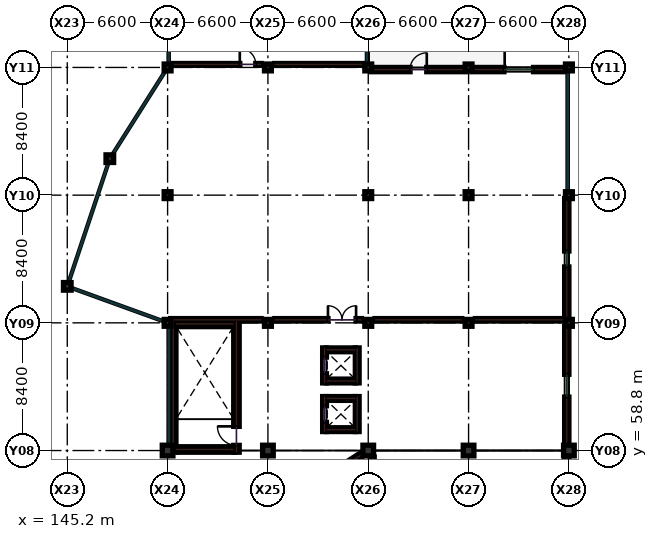
"""IFC4 building model, lengths in metres.
Left out: names, types, materials, properties, quantities, classifications, styles, units other than length and angle.
Written with IfcOpenShell. Run it as: python <this file> out.ifc"""

import sys

from ifc_helpers import new_model, si_unit, direction, frame, frame_2d, origin, origin_2d, place, context, subcontext, project, spatial, rectangle, extrude, element, fill, save


model = new_model("IFC4")
c1 = context("Model", 3, precision=1e-05, world=origin(), true_north=direction((0.0, 1.0)))
c2 = subcontext(c1, "Body", "Model", "MODEL_VIEW")
j1 = project(units=[si_unit("LENGTHUNIT", "METRE"), si_unit("PLANEANGLEUNIT", "RADIAN")], contexts=[c1])
p1 = place(None, origin())
s1 = spatial("IfcSite", under=j1, at=p1, CompositionType="ELEMENT")
p2 = place(p1, origin())
s2 = spatial("IfcBuilding", under=s1, at=p2, CompositionType="ELEMENT")
p3 = place(p2, frame((0.0, 0.0, 18.6)))
s3 = spatial("IfcBuildingStorey", under=s2, at=p3, CompositionType="ELEMENT", Elevation=18.6)
p4 = place(p3, frame((151.8, 58.8, 0.0), z_axis=(0.0, 0.0, 1.0), x_axis=(1.0, 0.0, 0.0)))
e1 = element("IfcColumn", 1, at=p4, inside=s3, PredefinedType="COLUMN", context=c2, shape_type="SweptSolid", body=[
    extrude(rectangle(XDim=0.7, YDim=0.7, at=origin_2d()), origin(), (0.0, 0.0, 1.0), 4.2),
])
for number, where, z_axis, x_axis in (
    (2, (151.8, 67.2, 0.0), (0.0, 0.0, 1.0), (1.0, 0.0, 0.0)),
    (3, (151.8, 75.6, 0.0), (0.0, 0.0, 1.0), (1.0, 0.0, 0.0)),
    (4, (151.8, 84.0, 0.0), (0.0, 0.0, 1.0), (1.0, 0.0, 0.0)),
):
    element("IfcColumn", number, at=place(p3, frame(where, z_axis=z_axis, x_axis=x_axis)), inside=s3, PredefinedType="COLUMN", context=c2, shape_type="SweptSolid", body=[
        extrude(rectangle(XDim=0.45, YDim=0.45, at=origin_2d()), origin(), (0.0, 0.0, 1.0), 6.98),
    ])
p5 = place(p3, frame((158.4, 58.8, 0.0), z_axis=(0.0, 0.0, 1.0), x_axis=(1.0, 0.0, 0.0)))
e5 = element("IfcColumn", 5, at=p5, inside=s3, PredefinedType="COLUMN", context=c2, shape_type="SweptSolid", body=[
    extrude(rectangle(XDim=0.7, YDim=0.7, at=origin_2d()), origin(), (0.0, 0.0, 1.0), 4.2),
])
for number, where, z_axis, x_axis in (
    (6, (158.4, 67.2, 0.0), (0.0, 0.0, 1.0), (1.0, 0.0, 0.0)),
    (7, (158.4, 84.0, 0.0), (0.0, 0.0, 1.0), (1.0, 0.0, 0.0)),
):
    element("IfcColumn", number, at=place(p3, frame(where, z_axis=z_axis, x_axis=x_axis)), inside=s3, PredefinedType="COLUMN", context=c2, shape_type="SweptSolid", body=[
        extrude(rectangle(XDim=0.45, YDim=0.45, at=origin_2d()), origin(), (0.0, 0.0, 1.0), 5.495),
    ])
p6 = place(p3, frame((165.0, 58.8, 0.0), z_axis=(0.0, 0.0, 1.0), x_axis=(1.0, 0.0, 0.0)))
e8 = element("IfcColumn", 8, at=p6, inside=s3, PredefinedType="COLUMN", context=c2, shape_type="SweptSolid", body=[
    extrude(rectangle(XDim=0.7, YDim=0.7, at=origin_2d()), origin(), (0.0, 0.0, 1.0), 4.2),
])
for number, where, z_axis, x_axis in (
    (9, (165.0, 67.2, 0.0), (0.0, 0.0, 1.0), (1.0, 0.0, 0.0)),
    (10, (165.0, 75.6, 0.0), (0.0, 0.0, 1.0), (1.0, 0.0, 0.0)),
    (11, (165.0, 84.0, 0.0), (0.0, 0.0, 1.0), (1.0, 0.0, 0.0)),
):
    element("IfcColumn", number, at=place(p3, frame(where, z_axis=z_axis, x_axis=x_axis)), inside=s3, PredefinedType="COLUMN", context=c2, shape_type="SweptSolid", body=[
        extrude(rectangle(XDim=0.45, YDim=0.45, at=origin_2d()), origin(), (0.0, 0.0, 1.0), 4.01),
    ])
p7 = place(p3, frame((171.6, 58.8, 0.0), z_axis=(0.0, 0.0, 1.0), x_axis=(1.0, 0.0, 0.0)))
e12 = element("IfcColumn", 12, at=p7, inside=s3, PredefinedType="COLUMN", context=c2, shape_type="SweptSolid", body=[
    extrude(rectangle(XDim=0.7, YDim=0.7, at=origin_2d()), origin(), (0.0, 0.0, 1.0), 4.2),
])
for number, where, z_axis, x_axis in (
    (13, (171.6, 67.2, 0.0), (0.0, 0.0, 1.0), (1.0, 0.0, 0.0)),
    (14, (171.6, 75.6, 0.0), (0.0, 0.0, 1.0), (1.0, 0.0, 0.0)),
    (15, (171.6, 84.0, 0.0), (0.0, 0.0, 1.0), (1.0, 0.0, 0.0)),
):
    element("IfcColumn", number, at=place(p3, frame(where, z_axis=z_axis, x_axis=x_axis)), inside=s3, PredefinedType="COLUMN", context=c2, shape_type="SweptSolid", body=[
        extrude(rectangle(XDim=0.45, YDim=0.45, at=origin_2d()), origin(), (0.0, 0.0, 1.0), 5.66),
    ])
p8 = place(p3, frame((178.2, 58.8, 0.0), z_axis=(0.0, 0.0, 1.0), x_axis=(1.0, 0.0, 0.0)))
e16 = element("IfcColumn", 16, at=p8, inside=s3, PredefinedType="COLUMN", context=c2, shape_type="SweptSolid", body=[
    extrude(rectangle(XDim=0.7, YDim=0.7, at=origin_2d()), origin(), (0.0, 0.0, 1.0), 4.2),
])
for number, where, z_axis, x_axis in (
    (17, (178.2, 67.2, 0.0), (0.0, 0.0, 1.0), (1.0, 0.0, 0.0)),
    (18, (178.2, 75.6, 0.0), (0.0, 0.0, 1.0), (1.0, 0.0, 0.0)),
    (19, (178.2, 84.0, 0.0), (0.0, 0.0, 1.0), (1.0, 0.0, 0.0)),
):
    element("IfcColumn", number, at=place(p3, frame(where, z_axis=z_axis, x_axis=x_axis)), inside=s3, PredefinedType="COLUMN", context=c2, shape_type="SweptSolid", body=[
        extrude(rectangle(XDim=0.45, YDim=0.45, at=origin_2d()), origin(), (0.0, 0.0, 1.0), 7.31),
    ])
for number, where, z_axis, x_axis in (
    (20, (145.2, 69.6, 0.0), (0.0, 0.0, 1.0), (1.0, 0.0, 0.0)),
    (21, (148.0, 78.0, 0.0), (0.0, 0.0, 1.0), (1.0, 0.0, 0.0)),
):
    element("IfcColumn", number, at=place(p3, frame(where, z_axis=z_axis, x_axis=x_axis)), inside=s3, PredefinedType="COLUMN", context=c2, shape_type="SweptSolid", body=[
        extrude(rectangle(XDim=0.5, YDim=0.5, at=origin_2d()), origin(), (0.0, 0.0, 1.0), 6.74),
    ])
p9 = place(p3, frame((152.0, 67.4, 0.0), z_axis=(0.0, 0.0, 1.0), x_axis=(1.0, 0.0, 0.0)))
e22 = element("IfcWall", 22, at=p9, inside=s3, PredefinedType="PARTITIONING", context=c2, shape_type="SweptSolid", body=[
    extrude(rectangle(XDim=5.95, YDim=0.16, at=frame_2d((2.975, 0.0))), origin(), (0.0, 0.0, 1.0), 3.19),
])
p10 = place(p3, frame((158.85, 67.4, 0.0), z_axis=(0.0, 0.0, 1.0), x_axis=(1.0, 0.0, 0.0)))
e23 = element("IfcWall", 23, at=p10, inside=s3, PredefinedType="PARTITIONING", context=c2, shape_type="SweptSolid", body=[
    extrude(rectangle(XDim=5.7, YDim=0.16, at=frame_2d((2.85, 0.0))), origin(), (0.0, 0.0, 1.0), 3.19),
])
p11 = place(p10, frame((3.5, 0.0, 0.0)))
e24 = element("IfcOpeningElement", 24, at=p11, cuts=e23, PredefinedType="OPENING", context=c2, shape_type="SweptSolid", body=[
    extrude(rectangle(XDim=1.85, YDim=2.25, at=frame_2d((0.925, 1.125))), frame((0.0, 0.09, 0.0), z_axis=(0.0, -1.0, 0.0), x_axis=(1.0, 0.0, 0.0)), (0.0, 0.0, 1.0), 0.18),
])
p12 = place(p3, frame((165.45, 67.4, 0.0), z_axis=(0.0, 0.0, 1.0), x_axis=(1.0, 0.0, 0.0)))
e25 = element("IfcWall", 25, at=p12, inside=s3, PredefinedType="PARTITIONING", context=c2, shape_type="SweptSolid", body=[
    extrude(rectangle(XDim=5.7, YDim=0.16, at=frame_2d((2.85, 0.0))), origin(), (0.0, 0.0, 1.0), 3.19),
])
p13 = place(p3, frame((172.05, 67.4, 0.0), z_axis=(0.0, 0.0, 1.0), x_axis=(1.0, 0.0, 0.0)))
e26 = element("IfcWall", 26, at=p13, inside=s3, PredefinedType="PARTITIONING", context=c2, shape_type="SweptSolid", body=[
    extrude(rectangle(XDim=5.83, YDim=0.16, at=frame_2d((2.915, 0.0))), origin(), (0.0, 0.0, 1.0), 3.19),
])
p14 = place(p3, frame((152.0, 84.2, 0.0), z_axis=(0.0, 0.0, 1.0), x_axis=(1.0, 0.0, 0.0)))
e27 = element("IfcWall", 27, at=p14, inside=s3, PredefinedType="PARTITIONING", context=c2, shape_type="SweptSolid", body=[
    extrude(rectangle(XDim=5.95, YDim=0.12, at=frame_2d((2.975, 0.0))), origin(), (0.0, 0.0, 1.0), 3.19),
])
p15 = place(p14, frame((4.55, 0.0, 0.0)))
e28 = element("IfcOpeningElement", 28, at=p15, cuts=e27, PredefinedType="OPENING", context=c2, shape_type="SweptSolid", body=[
    extrude(rectangle(XDim=1.05, YDim=2.15, at=frame_2d((0.525, 1.075))), frame((0.0, 0.07, 0.0), z_axis=(0.0, -1.0, 0.0), x_axis=(1.0, 0.0, 0.0)), (0.0, 0.0, 1.0), 0.14),
])
p16 = place(p3, frame((158.85, 84.2, 0.0), z_axis=(0.0, 0.0, 1.0), x_axis=(1.0, 0.0, 0.0)))
e29 = element("IfcWall", 29, at=p16, inside=s3, PredefinedType="PARTITIONING", context=c2, shape_type="SweptSolid", body=[
    extrude(rectangle(XDim=5.83, YDim=0.12, at=frame_2d((2.915, 0.0))), origin(), (0.0, 0.0, 1.0), 3.19),
])
p17 = place(p3, frame((165.3, 50.85, 0.0), z_axis=(0.0, 0.0, 1.0), x_axis=(0.0, 1.0, 0.0)))
e30 = element("IfcWall", 30, at=p17, inside=s3, PredefinedType="SOLIDWALL", context=c2, shape_type="SweptSolid", body=[
    extrude(rectangle(XDim=7.53, YDim=0.18, at=frame_2d((3.765, 0.0))), origin(), (0.0, 0.0, 1.0), 3.19),
])
p18 = place(p17, frame((4.4, 0.0, 0.0)))
e31 = element("IfcOpeningElement", 31, at=p18, cuts=e30, PredefinedType="OPENING", context=c2, shape_type="SweptSolid", body=[
    extrude(rectangle(XDim=1.6, YDim=2.2, at=frame_2d((0.8, 1.1))), frame((0.0, 0.1, 0.0), z_axis=(0.0, -1.0, 0.0), x_axis=(1.0, 0.0, 0.0)), (0.0, 0.0, 1.0), 0.2),
])
p19 = place(p3, frame((171.38, 83.86, 0.0), z_axis=(0.0, 0.0, 1.0), x_axis=(-1.0, 0.0, 0.0)))
e32 = element("IfcWall", 32, at=p19, inside=s3, PredefinedType="SOLIDWALL", context=c2, shape_type="SweptSolid", body=[
    extrude(rectangle(XDim=6.16, YDim=0.28, at=frame_2d((3.08, 0.0))), origin(), (0.0, 0.0, 1.0), 3.35),
])
p20 = place(p19, frame((2.53, 0.0, 0.0)))
e33 = element("IfcOpeningElement", 33, at=p20, cuts=e32, PredefinedType="OPENING", context=c2, shape_type="SweptSolid", body=[
    extrude(rectangle(XDim=1.1, YDim=2.2, at=frame_2d((0.55, 1.1))), frame((0.0, 0.15, 0.0), z_axis=(0.0, -1.0, 0.0), x_axis=(1.0, 0.0, 0.0)), (0.0, 0.0, 1.0), 0.3),
])
p21 = place(p3, frame((178.06, 50.745, 0.0), z_axis=(0.0, 0.0, 1.0), x_axis=(0.0, 1.0, 0.0)))
e34 = element("IfcWall", 34, at=p21, inside=s3, PredefinedType="SOLIDWALL", context=c2, shape_type="SweptSolid", body=[
    extrude(rectangle(XDim=7.71, YDim=0.28, at=frame_2d((3.855, 0.0))), origin(), (0.0, 0.0, 1.0), 3.325),
])
p22 = place(p21, frame((2.955, 0.0, 0.95)))
e35 = element("IfcOpeningElement", 35, at=p22, cuts=e34, PredefinedType="OPENING", context=c2, shape_type="SweptSolid", body=[
    extrude(rectangle(XDim=1.8, YDim=1.6, at=frame_2d((0.9, 0.8))), frame((0.0, 0.15, 0.0), z_axis=(0.0, -1.0, 0.0), x_axis=(1.0, 0.0, 0.0)), (0.0, 0.0, 1.0), 0.3),
])
p23 = place(p3, frame((178.06, 59.145, 0.0), z_axis=(0.0, 0.0, 1.0), x_axis=(0.0, 1.0, 0.0)))
e36 = element("IfcWall", 36, at=p23, inside=s3, PredefinedType="SOLIDWALL", context=c2, shape_type="SweptSolid", body=[
    extrude(rectangle(XDim=7.835, YDim=0.28, at=frame_2d((3.917, 0.0))), origin(), (0.0, 0.0, 1.0), 3.325),
])
p24 = place(p23, frame((3.17, 0.0, 0.95)))
e37 = element("IfcOpeningElement", 37, at=p24, cuts=e36, PredefinedType="OPENING", context=c2, shape_type="SweptSolid", body=[
    extrude(rectangle(XDim=1.5, YDim=2.1, at=frame_2d((0.75, 1.05))), frame((0.0, 0.15, 0.0), z_axis=(0.0, -1.0, 0.0), x_axis=(1.0, 0.0, 0.0)), (0.0, 0.0, 1.0), 0.3),
])
p25 = place(p3, frame((178.06, 67.42, 0.0), z_axis=(0.0, 0.0, 1.0), x_axis=(0.0, 1.0, 0.0)))
e38 = element("IfcWall", 38, at=p25, inside=s3, PredefinedType="SOLIDWALL", context=c2, shape_type="SweptSolid", body=[
    extrude(rectangle(XDim=7.96, YDim=0.28, at=frame_2d((3.98, 0.0))), origin(), (0.0, 0.0, 1.0), 3.94),
])
p26 = place(p25, frame((3.455, 0.0, 0.95)))
e39 = element("IfcOpeningElement", 39, at=p26, cuts=e38, PredefinedType="OPENING", context=c2, shape_type="SweptSolid", body=[
    extrude(rectangle(XDim=1.05, YDim=1.75, at=frame_2d((0.525, 0.875))), frame((0.0, 0.15, 0.0), z_axis=(0.0, -1.0, 0.0), x_axis=(1.0, 0.0, 0.0)), (0.0, 0.0, 1.0), 0.3),
])
p27 = place(p3, frame((177.98, 83.86, 0.0), z_axis=(0.0, 0.0, 1.0), x_axis=(-1.0, 0.0, 0.0)))
e40 = element("IfcWall", 40, at=p27, inside=s3, PredefinedType="SOLIDWALL", context=c2, shape_type="SweptSolid", body=[
    extrude(rectangle(XDim=6.16, YDim=0.28, at=frame_2d((3.08, 0.0))), origin(), (0.0, 0.0, 1.0), 3.94),
])
p28 = place(p27, frame((2.105, 0.0, 0.95)))
e41 = element("IfcOpeningElement", 41, at=p28, cuts=e40, PredefinedType="OPENING", context=c2, shape_type="SweptSolid", body=[
    extrude(rectangle(XDim=1.95, YDim=1.55, at=frame_2d((0.975, 0.775))), frame((0.0, 0.15, 0.0), z_axis=(0.0, -1.0, 0.0), x_axis=(1.0, 0.0, 0.0)), (0.0, 0.0, 1.0), 0.3),
])
p29 = place(p3, frame((158.65, 54.76, 0.0), z_axis=(0.0, 0.0, 1.0), x_axis=(0.843786613851, 0.536678814829, 0.0)))
e42 = element("IfcWall", 42, at=p29, inside=s3, PredefinedType="SOLIDWALL", context=c2, shape_type="SweptSolid", body=[
    extrude(rectangle(XDim=7.229, YDim=0.28, at=frame_2d((3.615, 0.0))), origin(), (0.0, 0.0, 1.0), 3.325),
])
p30 = place(p29, frame((2.415, 0.0, 0.95)))
e43 = element("IfcOpeningElement", 43, at=p30, cuts=e42, PredefinedType="OPENING", context=c2, shape_type="SweptSolid", body=[
    extrude(rectangle(XDim=2.4, YDim=1.6, at=frame_2d((1.2, 0.8))), frame((0.0, 0.15, 0.0), z_axis=(0.0, -1.0, 0.0), x_axis=(1.0, 0.0, 0.0)), (0.0, 0.0, 1.0), 0.3),
])
p31 = place(p3, frame((152.17, 58.69, 0.0), z_axis=(0.0, 0.0, 1.0), x_axis=(0.0, 1.0, 0.0)))
e44 = element("IfcWall", 44, at=p31, inside=s3, PredefinedType="SHEAR", context=c2, shape_type="SweptSolid", body=[
    extrude(rectangle(XDim=8.62, YDim=0.36, at=frame_2d((4.31, 0.0))), origin(), (0.0, 0.0, 1.0), 3.96),
])
p32 = place(p3, frame((156.33, 58.69, 0.0), z_axis=(0.0, 0.0, 1.0), x_axis=(0.0, 1.0, 0.0)))
e45 = element("IfcWall", 45, at=p32, inside=s3, PredefinedType="SHEAR", context=c2, shape_type="SweptSolid", body=[
    extrude(rectangle(XDim=8.62, YDim=0.36, at=frame_2d((4.31, 0.0))), origin(), (0.0, 0.0, 1.0), 3.96),
])
p33 = place(p32, frame((0.45, 0.0, 0.0)))
e46 = element("IfcOpeningElement", 46, at=p33, cuts=e45, PredefinedType="OPENING", context=c2, shape_type="SweptSolid", body=[
    extrude(rectangle(XDim=1.25, YDim=2.15, at=frame_2d((0.625, 1.075))), frame((0.0, 0.19, 0.0), z_axis=(0.0, -1.0, 0.0), x_axis=(1.0, 0.0, 0.0)), (0.0, 0.0, 1.0), 0.38),
])
for number, where, z_axis, x_axis in (
    (47, (152.35, 67.13, 0.0), (0.0, 0.0, 1.0), (1.0, 0.0, 0.0)),
    (48, (152.35, 58.87, 0.0), (0.0, 0.0, 1.0), (1.0, 0.0, 0.0)),
):
    element("IfcWall", number, at=place(p3, frame(where, z_axis=z_axis, x_axis=x_axis)), inside=s3, PredefinedType="SHEAR", context=c2, shape_type="SweptSolid", body=[
        extrude(rectangle(XDim=3.8, YDim=0.36, at=frame_2d((1.9, 0.0))), origin(), (0.0, 0.0, 1.0), 3.96),
    ])
p34 = place(p3, frame((162.125, 60.05, 0.0), z_axis=(0.0, 0.0, 1.0), x_axis=(0.0, 1.0, 0.0)))
e49 = element("IfcWall", 49, at=p34, inside=s3, PredefinedType="SHEAR", context=c2, shape_type="SweptSolid", body=[
    extrude(rectangle(XDim=2.3, YDim=0.25, at=frame_2d((1.15, 0.0))), origin(), (0.0, 0.0, 1.0), 3.96),
])
p35 = place(p34, frame((0.6, 0.0, 0.0)))
e50 = element("IfcOpeningElement", 50, at=p35, cuts=e49, PredefinedType="OPENING", context=c2, shape_type="SweptSolid", body=[
    extrude(rectangle(XDim=1.1, YDim=2.15, at=frame_2d((0.55, 1.075))), frame((0.0, 0.135, 0.0), z_axis=(0.0, -1.0, 0.0), x_axis=(1.0, 0.0, 0.0)), (0.0, 0.0, 1.0), 0.27),
])
p36 = place(p3, frame((164.275, 60.05, 0.0), z_axis=(0.0, 0.0, 1.0), x_axis=(0.0, 1.0, 0.0)))
e51 = element("IfcWall", 51, at=p36, inside=s3, PredefinedType="SHEAR", context=c2, shape_type="SweptSolid", body=[
    extrude(rectangle(XDim=2.3, YDim=0.25, at=frame_2d((1.15, 0.0))), origin(), (0.0, 0.0, 1.0), 3.96),
])
for number, where, z_axis, x_axis in (
    (52, (162.25, 60.175, 0.0), (0.0, 0.0, 1.0), (1.0, 0.0, 0.0)),
    (53, (162.25, 62.225, 0.0), (0.0, 0.0, 1.0), (1.0, 0.0, 0.0)),
):
    element("IfcWall", number, at=place(p3, frame(where, z_axis=z_axis, x_axis=x_axis)), inside=s3, PredefinedType="SHEAR", context=c2, shape_type="SweptSolid", body=[
        extrude(rectangle(XDim=1.9, YDim=0.25, at=frame_2d((0.95, 0.0))), origin(), (0.0, 0.0, 1.0), 3.96),
    ])
p37 = place(p3, frame((162.125, 63.25, 0.0), z_axis=(0.0, 0.0, 1.0), x_axis=(0.0, 1.0, 0.0)))
e54 = element("IfcWall", 54, at=p37, inside=s3, PredefinedType="SHEAR", context=c2, shape_type="SweptSolid", body=[
    extrude(rectangle(XDim=2.3, YDim=0.25, at=frame_2d((1.15, 0.0))), origin(), (0.0, 0.0, 1.0), 3.96),
])
p38 = place(p37, frame((0.6, 0.0, 0.0)))
e55 = element("IfcOpeningElement", 55, at=p38, cuts=e54, PredefinedType="OPENING", context=c2, shape_type="SweptSolid", body=[
    extrude(rectangle(XDim=1.1, YDim=2.15, at=frame_2d((0.55, 1.075))), frame((0.0, 0.135, 0.0), z_axis=(0.0, -1.0, 0.0), x_axis=(1.0, 0.0, 0.0)), (0.0, 0.0, 1.0), 0.27),
])
p39 = place(p3, frame((164.275, 63.25, 0.0), z_axis=(0.0, 0.0, 1.0), x_axis=(0.0, 1.0, 0.0)))
e56 = element("IfcWall", 56, at=p39, inside=s3, PredefinedType="SHEAR", context=c2, shape_type="SweptSolid", body=[
    extrude(rectangle(XDim=2.3, YDim=0.25, at=frame_2d((1.15, 0.0))), origin(), (0.0, 0.0, 1.0), 3.96),
])
for number, where, z_axis, x_axis in (
    (57, (162.25, 63.375, 0.0), (0.0, 0.0, 1.0), (1.0, 0.0, 0.0)),
    (58, (162.25, 65.425, 0.0), (0.0, 0.0, 1.0), (1.0, 0.0, 0.0)),
):
    element("IfcWall", number, at=place(p3, frame(where, z_axis=z_axis, x_axis=x_axis)), inside=s3, PredefinedType="SHEAR", context=c2, shape_type="SweptSolid", body=[
        extrude(rectangle(XDim=1.9, YDim=0.25, at=frame_2d((0.95, 0.0))), origin(), (0.0, 0.0, 1.0), 3.96),
    ])
p40 = place(p11, origin())
e59 = element("IfcDoor", 59, at=p40, inside=s3, OperationType="DOUBLE_DOOR_SINGLE_SWING", PredefinedType="DOOR", context=c2, shape_type="SweptSolid", body=[
    extrude(rectangle(XDim=1.85, YDim=2.25, at=frame_2d((0.925, 1.125))), frame((0.0, 0.025, 0.0), z_axis=(0.0, -1.0, 0.0), x_axis=(1.0, 0.0, 0.0)), (0.0, 0.0, 1.0), 0.05),
])
fill(e24, e59)
p41 = place(p15, origin())
e60 = element("IfcDoor", 60, at=p41, inside=s3, OperationType="SINGLE_SWING_LEFT", PredefinedType="DOOR", context=c2, shape_type="SweptSolid", body=[
    extrude(rectangle(XDim=1.05, YDim=2.15, at=frame_2d((0.525, 1.075))), frame((0.0, 0.025, 0.0), z_axis=(0.0, -1.0, 0.0), x_axis=(1.0, 0.0, 0.0)), (0.0, 0.0, 1.0), 0.05),
])
fill(e28, e60)
p42 = place(p20, frame((1.1, 0.0, 0.0), z_axis=(0.0, 0.0, 1.0), x_axis=(-1.0, 0.0, 0.0)))
e61 = element("IfcDoor", 61, at=p42, inside=s3, OperationType="SINGLE_SWING_LEFT", PredefinedType="DOOR", context=c2, shape_type="SweptSolid", body=[
    extrude(rectangle(XDim=1.1, YDim=2.2, at=frame_2d((0.55, 1.1))), frame((0.0, 0.025, 0.0), z_axis=(0.0, -1.0, 0.0), x_axis=(1.0, 0.0, 0.0)), (0.0, 0.0, 1.0), 0.05),
])
fill(e33, e61)
p43 = place(p24, origin())
e62 = element("IfcWindow", 62, at=p43, inside=s3, PartitioningType="SINGLE_PANEL", PredefinedType="WINDOW", context=c2, shape_type="SweptSolid", body=[
    extrude(rectangle(XDim=1.5, YDim=2.1, at=frame_2d((0.75, 1.05))), frame((0.0, 0.03, 0.0), z_axis=(0.0, -1.0, 0.0), x_axis=(1.0, 0.0, 0.0)), (0.0, 0.0, 1.0), 0.06),
])
fill(e37, e62)
p44 = place(p26, origin())
e63 = element("IfcWindow", 63, at=p44, inside=s3, PartitioningType="SINGLE_PANEL", PredefinedType="WINDOW", context=c2, shape_type="SweptSolid", body=[
    extrude(rectangle(XDim=1.05, YDim=1.75, at=frame_2d((0.525, 0.875))), frame((0.0, 0.03, 0.0), z_axis=(0.0, -1.0, 0.0), x_axis=(1.0, 0.0, 0.0)), (0.0, 0.0, 1.0), 0.06),
])
fill(e39, e63)
p45 = place(p28, origin())
e64 = element("IfcWindow", 64, at=p45, inside=s3, PartitioningType="SINGLE_PANEL", PredefinedType="WINDOW", context=c2, shape_type="SweptSolid", body=[
    extrude(rectangle(XDim=1.95, YDim=1.55, at=frame_2d((0.975, 0.775))), frame((0.0, 0.03, 0.0), z_axis=(0.0, -1.0, 0.0), x_axis=(1.0, 0.0, 0.0)), (0.0, 0.0, 1.0), 0.06),
])
fill(e41, e64)
p46 = place(p33, origin())
e65 = element("IfcDoor", 65, at=p46, inside=s3, OperationType="SINGLE_SWING_RIGHT", PredefinedType="DOOR", context=c2, shape_type="SweptSolid", body=[
    extrude(rectangle(XDim=1.25, YDim=2.15, at=frame_2d((0.625, 1.075))), frame((0.0, 0.025, 0.0), z_axis=(0.0, -1.0, 0.0), x_axis=(1.0, 0.0, 0.0)), (0.0, 0.0, 1.0), 0.05),
])
fill(e46, e65)
p47 = place(p35, origin())
e66 = element("IfcDoor", 66, at=p47, inside=s3, OperationType="SLIDING_TO_LEFT", PredefinedType="DOOR", context=c2, shape_type="SweptSolid", body=[
    extrude(rectangle(XDim=1.1, YDim=2.15, at=frame_2d((0.55, 1.075))), frame((0.0, 0.025, 0.0), z_axis=(0.0, -1.0, 0.0), x_axis=(1.0, 0.0, 0.0)), (0.0, 0.0, 1.0), 0.05),
])
fill(e50, e66)
p48 = place(p38, origin())
e67 = element("IfcDoor", 67, at=p48, inside=s3, OperationType="SLIDING_TO_LEFT", PredefinedType="DOOR", context=c2, shape_type="SweptSolid", body=[
    extrude(rectangle(XDim=1.1, YDim=2.15, at=frame_2d((0.55, 1.075))), frame((0.0, 0.025, 0.0), z_axis=(0.0, -1.0, 0.0), x_axis=(1.0, 0.0, 0.0)), (0.0, 0.0, 1.0), 0.05),
])
fill(e55, e67)
save(model, sys.argv[1])
